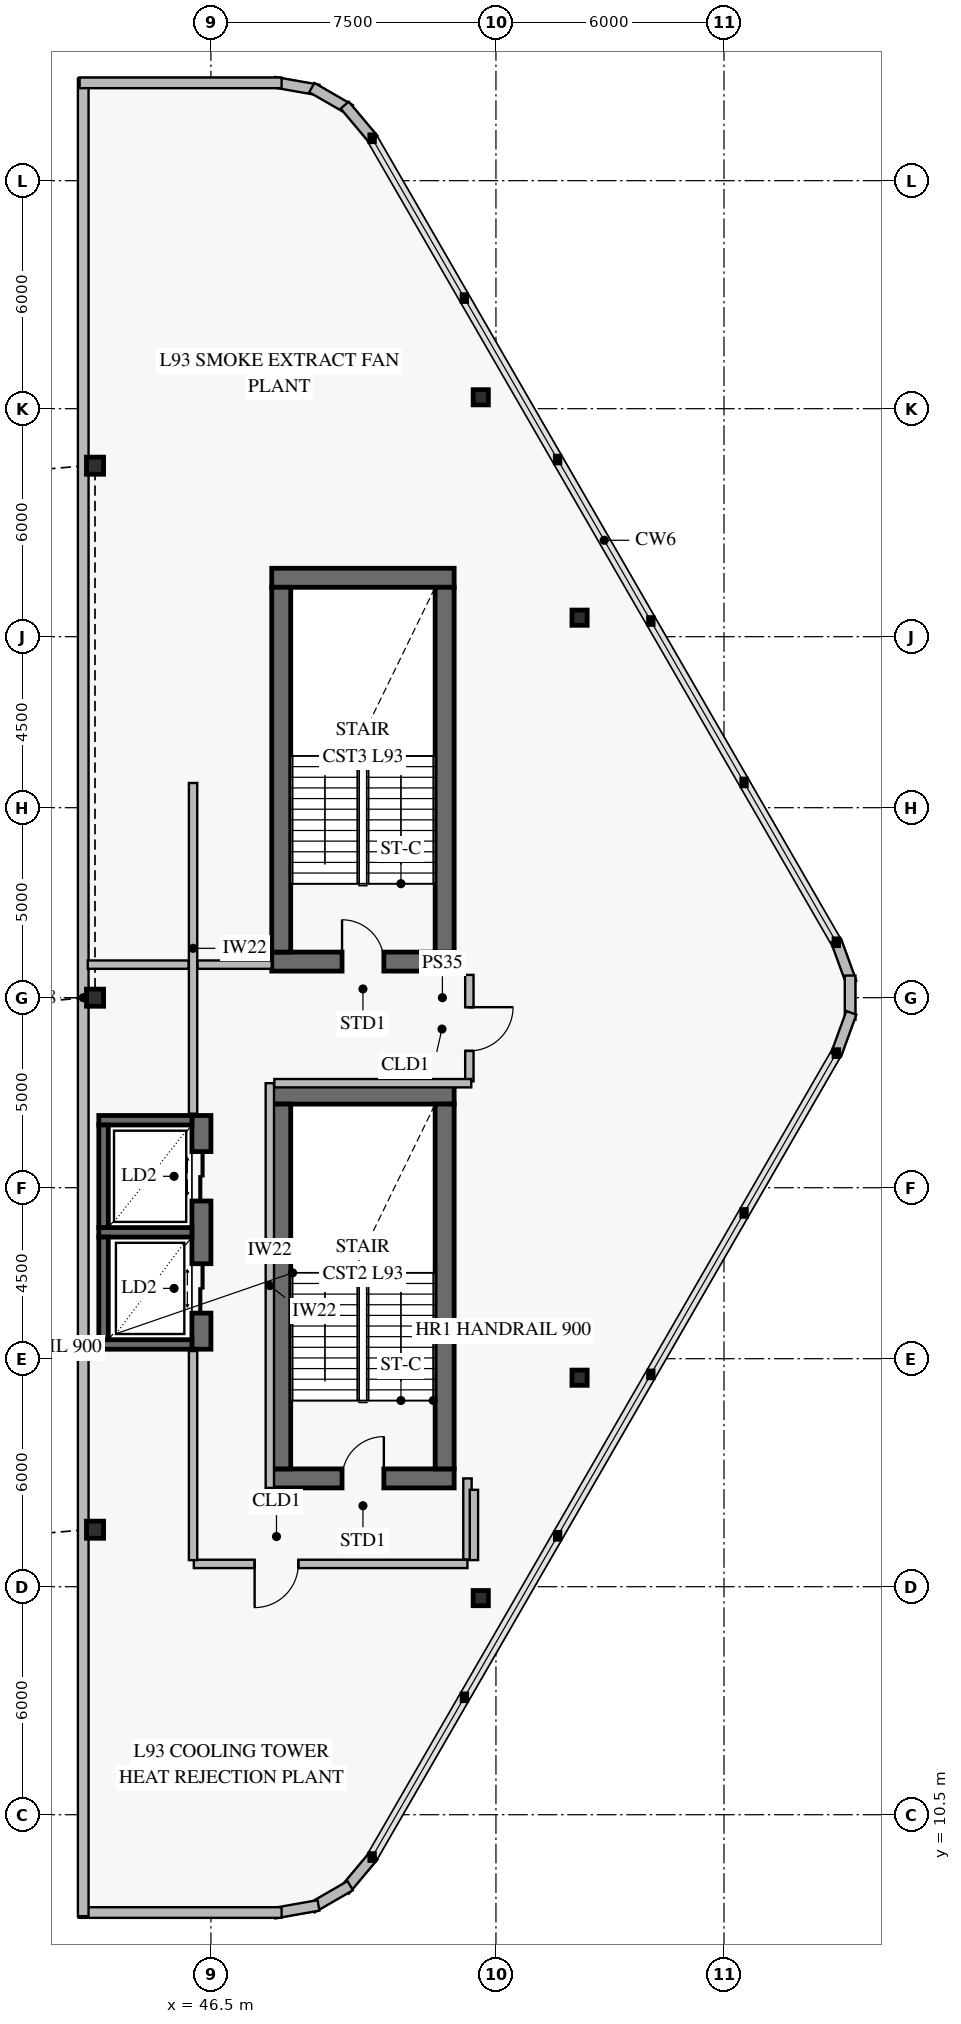
"""IFC4 building model, lengths in metres.
Left out: names, types, materials, properties, quantities, classifications, styles, units other than length and angle.
Written with IfcOpenShell. Run it as: python <this file> out.ifc"""

import sys

from ifc_helpers import new_model, si_unit, direction, frame, frame_2d, origin, origin_2d, place, context, subcontext, project, spatial, rectangle, hollow_rectangle, i_section, extrude, element, fill, save


model = new_model("IFC4")
c1 = context("Model", 3, precision=1e-05, world=origin(), true_north=direction((0.0, 1.0)))
c2 = subcontext(c1, "Body", "Model", "MODEL_VIEW")
j1 = project(units=[si_unit("LENGTHUNIT", "METRE"), si_unit("PLANEANGLEUNIT", "RADIAN")], contexts=[c1])
p1 = place(None, origin())
s1 = spatial("IfcSite", under=j1, at=p1, CompositionType="ELEMENT")
p2 = place(p1, origin())
s2 = spatial("IfcBuilding", under=s1, at=p2, CompositionType="ELEMENT")
p3 = place(p2, frame((0.0, 0.0, 365.8)))
s3 = spatial("IfcBuildingStorey", under=s2, at=p3, CompositionType="ELEMENT", Elevation=365.8)
p4 = place(p3, frame((48.1, 19.35, 0.0), z_axis=(0.0, 0.0, 1.0), x_axis=(1.0, 0.0, 0.0)))
e1 = element("IfcWall", 1, at=p4, inside=s3, PredefinedType="SHEAR", context=c2, shape_type="SweptSolid", body=[
    extrude(rectangle(XDim=4.8, YDim=0.5, at=frame_2d((2.4, 0.0))), origin(), (0.0, 0.0, 1.0), 4.4),
])
p5 = place(p4, frame((1.85, 0.0, 0.0)))
e2 = element("IfcOpeningElement", 2, at=p5, cuts=e1, PredefinedType="OPENING", context=c2, shape_type="SweptSolid", body=[
    extrude(rectangle(XDim=1.1, YDim=2.15, at=frame_2d((0.55, 1.075))), frame((0.0, 0.262, 0.0), z_axis=(0.0, -1.0, 0.0), x_axis=(1.0, 0.0, 0.0)), (0.0, 0.0, 1.0), 0.524),
])
p6 = place(p3, frame((52.9, 29.45, 0.0), z_axis=(0.0, 0.0, 1.0), x_axis=(-1.0, 0.0, 0.0)))
e3 = element("IfcWall", 3, at=p6, inside=s3, PredefinedType="SHEAR", context=c2, shape_type="SweptSolid", body=[
    extrude(rectangle(XDim=4.8, YDim=0.5, at=frame_2d((2.4, 0.0))), origin(), (0.0, 0.0, 1.0), 4.4),
])
for number, where, z_axis, x_axis in (
    (4, (48.35, 19.6, 0.0), (0.0, 0.0, 1.0), (0.0, 1.0, 0.0)),
    (5, (52.65, 29.2, 0.0), (0.0, 0.0, 1.0), (0.0, -1.0, 0.0)),
):
    element("IfcWall", number, at=place(p3, frame(where, z_axis=z_axis, x_axis=x_axis)), inside=s3, PredefinedType="SHEAR", context=c2, shape_type="SweptSolid", body=[
        extrude(rectangle(XDim=9.6, YDim=0.5, at=frame_2d((4.8, 0.0))), origin(), (0.0, 0.0, 1.0), 4.4),
    ])
p7 = place(p3, frame((48.1, 32.95, 0.0), z_axis=(0.0, 0.0, 1.0), x_axis=(1.0, 0.0, 0.0)))
e6 = element("IfcWall", 6, at=p7, inside=s3, PredefinedType="SHEAR", context=c2, shape_type="SweptSolid", body=[
    extrude(rectangle(XDim=4.8, YDim=0.5, at=frame_2d((2.4, 0.0))), origin(), (0.0, 0.0, 1.0), 4.4),
])
p8 = place(p7, frame((1.85, 0.0, 0.0)))
e7 = element("IfcOpeningElement", 7, at=p8, cuts=e6, PredefinedType="OPENING", context=c2, shape_type="SweptSolid", body=[
    extrude(rectangle(XDim=1.1, YDim=2.15, at=frame_2d((0.55, 1.075))), frame((0.0, 0.262, 0.0), z_axis=(0.0, -1.0, 0.0), x_axis=(1.0, 0.0, 0.0)), (0.0, 0.0, 1.0), 0.524),
])
p9 = place(p3, frame((52.9, 43.05, 0.0), z_axis=(0.0, 0.0, 1.0), x_axis=(-1.0, 0.0, 0.0)))
e8 = element("IfcWall", 8, at=p9, inside=s3, PredefinedType="SHEAR", context=c2, shape_type="SweptSolid", body=[
    extrude(rectangle(XDim=4.8, YDim=0.5, at=frame_2d((2.4, 0.0))), origin(), (0.0, 0.0, 1.0), 4.4),
])
for number, where, z_axis, x_axis in (
    (9, (48.35, 33.2, 0.0), (0.0, 0.0, 1.0), (0.0, 1.0, 0.0)),
    (10, (52.65, 42.8, 0.0), (0.0, 0.0, 1.0), (0.0, -1.0, 0.0)),
):
    element("IfcWall", number, at=place(p3, frame(where, z_axis=z_axis, x_axis=x_axis)), inside=s3, PredefinedType="SHEAR", context=c2, shape_type="SweptSolid", body=[
        extrude(rectangle(XDim=9.6, YDim=0.5, at=frame_2d((4.8, 0.0))), origin(), (0.0, 0.0, 1.0), 4.4),
    ])
p10 = place(p3, frame((46.25, 22.75, 0.0), z_axis=(0.0, 0.0, 1.0), x_axis=(0.0, 1.0, 0.0)))
e11 = element("IfcWall", 11, at=p10, inside=s3, PredefinedType="SHEAR", context=c2, shape_type="SweptSolid", body=[
    extrude(rectangle(XDim=6.15, YDim=0.5, at=frame_2d((3.075, 0.0))), origin(), (0.0, 0.0, 1.0), 4.4),
])
p11 = place(p10, frame((0.95, 0.0, 0.0)))
e12 = element("IfcOpeningElement", 12, at=p11, cuts=e11, PredefinedType="OPENING", context=c2, shape_type="SweptSolid", body=[
    extrude(rectangle(XDim=1.3, YDim=2.3, at=frame_2d((0.65, 1.15))), frame((0.0, 0.262, 0.0), z_axis=(0.0, -1.0, 0.0), x_axis=(1.0, 0.0, 0.0)), (0.0, 0.0, 1.0), 0.524),
])
p12 = place(p10, frame((3.9, 0.0, 0.0)))
e13 = element("IfcOpeningElement", 13, at=p12, cuts=e11, PredefinedType="OPENING", context=c2, shape_type="SweptSolid", body=[
    extrude(rectangle(XDim=1.3, YDim=2.3, at=frame_2d((0.65, 1.15))), frame((0.0, 0.262, 0.0), z_axis=(0.0, -1.0, 0.0), x_axis=(1.0, 0.0, 0.0)), (0.0, 0.0, 1.0), 0.524),
])
for number, where, z_axis, x_axis in (
    (14, (56.2, 22.0, 0.0), (0.0, 0.0, 1.0), (1.0, 0.0, 0.0)),
    (15, (56.2, 42.0, 0.0), (0.0, 0.0, 1.0), (1.0, 0.0, 0.0)),
    (16, (53.6, 16.2, 0.0), (0.0, 0.0, 1.0), (1.0, 0.0, 0.0)),
    (17, (53.6, 47.8, 0.0), (0.0, 0.0, 1.0), (1.0, 0.0, 0.0)),
):
    element("IfcColumn", number, at=place(p3, frame(where, z_axis=z_axis, x_axis=x_axis)), inside=s3, PredefinedType="COLUMN", context=c2, shape_type="SweptSolid", body=[
        extrude(i_section(OverallWidth=0.4, OverallDepth=0.4, WebThickness=0.013, FlangeThickness=0.021, at=origin_2d()), origin(), (0.0, 0.0, 1.0), 4.05),
    ])
for number, where, z_axis, x_axis in (
    (18, (43.45, 18.0, 0.0), (0.0, 0.0, 1.0), (1.0, 0.0, 0.0)),
    (19, (43.45, 32.0, 0.0), (0.0, 0.0, 1.0), (1.0, 0.0, 0.0)),
    (20, (43.45, 46.0, 0.0), (0.0, 0.0, 1.0), (1.0, 0.0, 0.0)),
):
    element("IfcColumn", number, at=place(p3, frame(where, z_axis=z_axis, x_axis=x_axis)), inside=s3, PredefinedType="PILASTER", context=c2, shape_type="SweptSolid", body=[
        extrude(hollow_rectangle(XDim=0.45, YDim=0.45, WallThickness=0.022, at=origin_2d()), origin(), (0.0, 0.0, 1.0), 4.05),
    ])
p13 = place(p3, frame((48.171, 56.091, 0.0), z_axis=(0.0, 0.0, 1.0), x_axis=(0.984798162481, -0.173702559495, 0.0)))
e21 = element("IfcWall", 21, at=p13, inside=s3, PredefinedType="SOLIDWALL", context=c2, shape_type="SweptSolid", body=[
    extrude(rectangle(XDim=1.178, YDim=0.28, at=frame_2d((0.589, 0.0))), origin(), (0.0, 0.0, 1.0), 4.05),
])
p14 = place(p3, frame((49.155, 55.95, 0.0), z_axis=(0.0, 0.0, 1.0), x_axis=(0.865951785477, -0.500127488975, 0.0)))
e22 = element("IfcWall", 22, at=p14, inside=s3, PredefinedType="SOLIDWALL", context=c2, shape_type="SweptSolid", body=[
    extrude(rectangle(XDim=1.165, YDim=0.28, at=frame_2d((0.583, 0.0))), origin(), (0.0, 0.0, 1.0), 4.05),
])
for number, where, z_axis, x_axis in (
    (23, (50.021, 55.488, 0.0), (0.0, 0.0, 1.0), (0.643, -0.766, 0.0)),
    (24, (62.948, 33.505, 0.0), (0.0, 0.0, 1.0), (0.342, -0.94, 0.0)),
):
    element("IfcWall", number, at=place(p3, frame(where, z_axis=z_axis, x_axis=x_axis)), inside=s3, PredefinedType="SOLIDWALL", context=c2, shape_type="SweptSolid", body=[
        extrude(rectangle(XDim=1.178, YDim=0.28, at=frame_2d((0.589, 0.0))), origin(), (0.0, 0.0, 1.0), 4.05),
    ])
p15 = place(p3, frame((63.319, 32.583, 0.0), z_axis=(0.0, 0.0, 1.0), x_axis=(0.0, -1.0, 0.0)))
e25 = element("IfcWall", 25, at=p15, inside=s3, PredefinedType="SOLIDWALL", context=c2, shape_type="SweptSolid", body=[
    extrude(rectangle(XDim=1.165, YDim=0.28, at=frame_2d((0.583, 0.0))), origin(), (0.0, 0.0, 1.0), 4.05),
])
for number, where, z_axis, x_axis in (
    (26, (63.351, 31.602, 0.0), (0.0, 0.0, 1.0), (-0.342, -0.94, 0.0)),
    (27, (50.778, 9.414, 0.0), (0.0, 0.0, 1.0), (-0.643, -0.766, 0.0)),
):
    element("IfcWall", number, at=place(p3, frame(where, z_axis=z_axis, x_axis=x_axis)), inside=s3, PredefinedType="SOLIDWALL", context=c2, shape_type="SweptSolid", body=[
        extrude(rectangle(XDim=1.178, YDim=0.28, at=frame_2d((0.589, 0.0))), origin(), (0.0, 0.0, 1.0), 4.05),
    ])
p16 = place(p3, frame((50.164, 8.633, 0.0), z_axis=(0.0, 0.0, 1.0), x_axis=(-0.865951785477, -0.500127488975, 0.0)))
e28 = element("IfcWall", 28, at=p16, inside=s3, PredefinedType="SOLIDWALL", context=c2, shape_type="SweptSolid", body=[
    extrude(rectangle(XDim=1.165, YDim=0.28, at=frame_2d((0.583, 0.0))), origin(), (0.0, 0.0, 1.0), 4.05),
])
p17 = place(p3, frame((49.331, 8.114, 0.0), z_axis=(0.0, 0.0, 1.0), x_axis=(-0.984798162481, -0.173702559495, 0.0)))
e29 = element("IfcWall", 29, at=p17, inside=s3, PredefinedType="SOLIDWALL", context=c2, shape_type="SweptSolid", body=[
    extrude(rectangle(XDim=1.178, YDim=0.28, at=frame_2d((0.589, 0.0))), origin(), (0.0, 0.0, 1.0), 4.05),
])
p18 = place(p3, frame((48.36, 7.926, 0.0), z_axis=(0.0, 0.0, 1.0), x_axis=(-1.0, 0.0, 0.0)))
e30 = element("IfcWall", 30, at=p18, inside=s3, PredefinedType="SOLIDWALL", context=c2, shape_type="SweptSolid", body=[
    extrude(rectangle(XDim=5.315, YDim=0.28, at=frame_2d((2.657, 0.0))), origin(), (0.0, 0.0, 1.0), 4.05),
])
p19 = place(p3, frame((43.14, 7.831, 0.0), z_axis=(0.0, 0.0, 1.0), x_axis=(0.0, 1.0, 0.0)))
e31 = element("IfcWall", 31, at=p19, inside=s3, PredefinedType="SOLIDWALL", context=c2, shape_type="SweptSolid", body=[
    extrude(rectangle(XDim=48.338, YDim=0.28, at=frame_2d((24.169, 0.0))), origin(), (0.0, 0.0, 1.0), 3.465),
])
p20 = place(p3, frame((43.045, 56.074, 0.0), z_axis=(0.0, 0.0, 1.0), x_axis=(1.0, 0.0, 0.0)))
e32 = element("IfcWall", 32, at=p20, inside=s3, PredefinedType="SOLIDWALL", context=c2, shape_type="SweptSolid", body=[
    extrude(rectangle(XDim=5.315, YDim=0.28, at=frame_2d((2.657, 0.0))), origin(), (0.0, 0.0, 1.0), 4.05),
])
for number, where, z_axis, x_axis in (
    (33, (43.55, 22.875, 0.0), (0.0, 0.0, 1.0), (1.0, 0.0, 0.0)),
    (34, (43.55, 25.825, 0.0), (0.0, 0.0, 1.0), (1.0, 0.0, 0.0)),
):
    element("IfcWall", number, at=place(p3, frame(where, z_axis=z_axis, x_axis=x_axis)), inside=s3, PredefinedType="SOLIDWALL", context=c2, shape_type="SweptSolid", body=[
        extrude(rectangle(XDim=2.45, YDim=0.25, at=frame_2d((1.225, 0.0))), origin(), (0.0, 0.0, 1.0), 4.4),
    ])
p21 = place(p3, frame((43.675, 23.0, 0.0), z_axis=(0.0, 0.0, 1.0), x_axis=(0.0, 1.0, 0.0)))
e35 = element("IfcWall", 35, at=p21, inside=s3, PredefinedType="SOLIDWALL", context=c2, shape_type="SweptSolid", body=[
    extrude(rectangle(XDim=2.7, YDim=0.25, at=frame_2d((1.35, 0.0))), origin(), (0.0, 0.0, 1.0), 4.4),
])
p22 = place(p3, frame((43.55, 28.775, 0.0), z_axis=(0.0, 0.0, 1.0), x_axis=(1.0, 0.0, 0.0)))
e36 = element("IfcWall", 36, at=p22, inside=s3, PredefinedType="SOLIDWALL", context=c2, shape_type="SweptSolid", body=[
    extrude(rectangle(XDim=2.45, YDim=0.25, at=frame_2d((1.225, 0.0))), origin(), (0.0, 0.0, 1.0), 4.4),
])
p23 = place(p3, frame((43.675, 25.95, 0.0), z_axis=(0.0, 0.0, 1.0), x_axis=(0.0, 1.0, 0.0)))
e37 = element("IfcWall", 37, at=p23, inside=s3, PredefinedType="SOLIDWALL", context=c2, shape_type="SweptSolid", body=[
    extrude(rectangle(XDim=2.7, YDim=0.25, at=frame_2d((1.35, 0.0))), origin(), (0.0, 0.0, 1.0), 4.4),
])
p24 = place(p3, frame((46.05, 17.1, 0.0), z_axis=(0.0, 0.0, 1.0), x_axis=(1.0, 0.0, 0.0)))
e38 = element("IfcWall", 38, at=p24, inside=s3, PredefinedType="PARTITIONING", context=c2, shape_type="SweptSolid", body=[
    extrude(rectangle(XDim=7.2, YDim=0.22, at=frame_2d((3.6, 0.0))), origin(), (0.0, 0.0, 1.0), 3.47),
])
p25 = place(p24, frame((1.6, 0.0, 0.0)))
e39 = element("IfcOpeningElement", 39, at=p25, cuts=e38, PredefinedType="OPENING", context=c2, shape_type="SweptSolid", body=[
    extrude(rectangle(XDim=1.15, YDim=2.2, at=frame_2d((0.575, 1.1))), frame((0.0, 0.122, 0.0), z_axis=(0.0, -1.0, 0.0), x_axis=(1.0, 0.0, 0.0)), (0.0, 0.0, 1.0), 0.244),
])
p26 = place(p3, frame((53.3, 29.8, 0.0), z_axis=(0.0, 0.0, 1.0), x_axis=(0.0, 1.0, 0.0)))
e40 = element("IfcWall", 40, at=p26, inside=s3, PredefinedType="PARTITIONING", context=c2, shape_type="SweptSolid", body=[
    extrude(rectangle(XDim=2.8, YDim=0.22, at=frame_2d((1.4, 0.0))), origin(), (0.0, 0.0, 1.0), 4.05),
])
p27 = place(p26, frame((0.8, 0.0, 0.0)))
e41 = element("IfcOpeningElement", 41, at=p27, cuts=e40, PredefinedType="OPENING", context=c2, shape_type="SweptSolid", body=[
    extrude(rectangle(XDim=1.15, YDim=2.2, at=frame_2d((0.575, 1.1))), frame((0.0, 0.122, 0.0), z_axis=(0.0, -1.0, 0.0), x_axis=(1.0, 0.0, 0.0)), (0.0, 0.0, 1.0), 0.244),
])
p28 = place(p3, frame((53.25, 17.218, 0.0), z_axis=(0.0, 0.0, 1.0), x_axis=(0.0, 1.0, 0.0)))
e42 = element("IfcWall", 42, at=p28, inside=s3, PredefinedType="PARTITIONING", context=c2, shape_type="SweptSolid", body=[
    extrude(rectangle(XDim=2.132, YDim=0.22, at=frame_2d((1.066, 0.0))), origin(), (0.0, 0.0, 1.0), 4.05),
])
p29 = place(p3, frame((48.05, 19.1, 0.0), z_axis=(0.0, 0.0, 1.0), x_axis=(0.0, 1.0, 0.0)))
e43 = element("IfcWall", 43, at=p29, inside=s3, PredefinedType="PARTITIONING", context=c2, shape_type="SweptSolid", body=[
    extrude(rectangle(XDim=10.65, YDim=0.22, at=frame_2d((5.325, 0.0))), origin(), (0.0, 0.0, 1.0), 3.47),
])
p30 = place(p3, frame((48.168, 29.75, 0.0), z_axis=(0.0, 0.0, 1.0), x_axis=(1.0, 0.0, 0.0)))
e44 = element("IfcWall", 44, at=p30, inside=s3, PredefinedType="PARTITIONING", context=c2, shape_type="SweptSolid", body=[
    extrude(rectangle(XDim=5.182, YDim=0.22, at=frame_2d((2.591, 0.0))), origin(), (0.0, 0.0, 1.0), 4.05),
])
p31 = place(p3, frame((46.03, 22.701, 0.0), z_axis=(0.0, 0.0, 1.0), x_axis=(0.0, -1.0, 0.0)))
e45 = element("IfcWall", 45, at=p31, inside=s3, PredefinedType="PARTITIONING", context=c2, shape_type="SweptSolid", body=[
    extrude(rectangle(XDim=5.501, YDim=0.22, at=frame_2d((2.751, 0.0))), origin(), (0.0, 0.0, 1.0), 3.47),
])
p32 = place(p3, frame((53.42, 17.2, 0.0), z_axis=(0.0, 0.0, 1.0), x_axis=(0.0, 1.0, 0.0)))
e46 = element("IfcWall", 46, at=p32, inside=s3, PredefinedType="PARTITIONING", context=c2, shape_type="SweptSolid", body=[
    extrude(rectangle(XDim=1.85, YDim=0.22, at=frame_2d((0.925, 0.0))), origin(), (0.0, 0.0, 1.0), 4.05),
])
p33 = place(p3, frame((46.03, 37.65, 0.0), z_axis=(0.0, 0.0, 1.0), x_axis=(0.0, -1.0, 0.0)))
e47 = element("IfcWall", 47, at=p33, inside=s3, PredefinedType="PARTITIONING", context=c2, shape_type="SweptSolid", body=[
    extrude(rectangle(XDim=8.701, YDim=0.22, at=frame_2d((4.351, 0.0))), origin(), (0.0, 0.0, 1.0), 4.05),
])
p34 = place(p3, frame((48.1, 32.87, 0.0), z_axis=(0.0, 0.0, 1.0), x_axis=(-1.0, 0.0, 0.0)))
e48 = element("IfcWall", 48, at=p34, inside=s3, PredefinedType="PARTITIONING", context=c2, shape_type="SweptSolid", body=[
    extrude(rectangle(XDim=1.952, YDim=0.22, at=frame_2d((0.976, 0.0))), origin(), (0.0, 0.0, 1.0), 4.05),
])
p35 = place(p3, frame((45.912, 32.87, 0.0), z_axis=(0.0, 0.0, 1.0), x_axis=(-1.0, 0.0, 0.0)))
e49 = element("IfcWall", 49, at=p35, inside=s3, PredefinedType="PARTITIONING", context=c2, shape_type="SweptSolid", body=[
    extrude(rectangle(XDim=2.652, YDim=0.22, at=frame_2d((1.326, 0.0))), origin(), (0.0, 0.0, 1.0), 3.47),
])
p36 = place(p5, origin())
e50 = element("IfcDoor", 50, at=p36, inside=s3, OperationType="SINGLE_SWING_RIGHT", PredefinedType="USERDEFINED", context=c2, shape_type="SweptSolid", body=[
    extrude(rectangle(XDim=1.1, YDim=2.15, at=frame_2d((0.55, 1.075))), frame((0.0, 0.025, 0.0), z_axis=(0.0, -1.0, 0.0), x_axis=(1.0, 0.0, 0.0)), (0.0, 0.0, 1.0), 0.05),
])
fill(e2, e50)
p37 = place(p8, origin())
e51 = element("IfcDoor", 51, at=p37, inside=s3, OperationType="SINGLE_SWING_LEFT", PredefinedType="USERDEFINED", context=c2, shape_type="SweptSolid", body=[
    extrude(rectangle(XDim=1.1, YDim=2.15, at=frame_2d((0.55, 1.075))), frame((0.0, 0.025, 0.0), z_axis=(0.0, -1.0, 0.0), x_axis=(1.0, 0.0, 0.0)), (0.0, 0.0, 1.0), 0.05),
])
fill(e7, e51)
p38 = place(p11, frame((1.3, 0.0, 0.0), z_axis=(0.0, 0.0, 1.0), x_axis=(-1.0, 0.0, 0.0)))
e52 = element("IfcDoor", 52, at=p38, inside=s3, OperationType="DOUBLE_DOOR_SLIDING", PredefinedType="DOOR", context=c2, shape_type="SweptSolid", body=[
    extrude(rectangle(XDim=1.3, YDim=2.3, at=frame_2d((0.65, 1.15))), frame((0.0, 0.025, 0.0), z_axis=(0.0, -1.0, 0.0), x_axis=(1.0, 0.0, 0.0)), (0.0, 0.0, 1.0), 0.05),
])
fill(e12, e52)
p39 = place(p12, frame((1.3, 0.0, 0.0), z_axis=(0.0, 0.0, 1.0), x_axis=(-1.0, 0.0, 0.0)))
e53 = element("IfcDoor", 53, at=p39, inside=s3, OperationType="DOUBLE_DOOR_SLIDING", PredefinedType="DOOR", context=c2, shape_type="SweptSolid", body=[
    extrude(rectangle(XDim=1.3, YDim=2.3, at=frame_2d((0.65, 1.15))), frame((0.0, 0.025, 0.0), z_axis=(0.0, -1.0, 0.0), x_axis=(1.0, 0.0, 0.0)), (0.0, 0.0, 1.0), 0.05),
])
fill(e13, e53)
p40 = place(p25, frame((1.15, 0.0, 0.0), z_axis=(0.0, 0.0, 1.0), x_axis=(-1.0, 0.0, 0.0)))
e54 = element("IfcDoor", 54, at=p40, inside=s3, OperationType="SINGLE_SWING_RIGHT", PredefinedType="DOOR", context=c2, shape_type="SweptSolid", body=[
    extrude(rectangle(XDim=1.15, YDim=2.2, at=frame_2d((0.575, 1.1))), frame((0.0, 0.025, 0.0), z_axis=(0.0, -1.0, 0.0), x_axis=(1.0, 0.0, 0.0)), (0.0, 0.0, 1.0), 0.05),
])
fill(e39, e54)
p41 = place(p27, frame((1.15, 0.0, 0.0), z_axis=(0.0, 0.0, 1.0), x_axis=(-1.0, 0.0, 0.0)))
e55 = element("IfcDoor", 55, at=p41, inside=s3, OperationType="SINGLE_SWING_LEFT", PredefinedType="DOOR", context=c2, shape_type="SweptSolid", body=[
    extrude(rectangle(XDim=1.15, YDim=2.2, at=frame_2d((0.575, 1.1))), frame((0.0, 0.025, 0.0), z_axis=(0.0, -1.0, 0.0), x_axis=(1.0, 0.0, 0.0)), (0.0, 0.0, 1.0), 0.05),
])
fill(e41, e55)
save(model, sys.argv[1])
